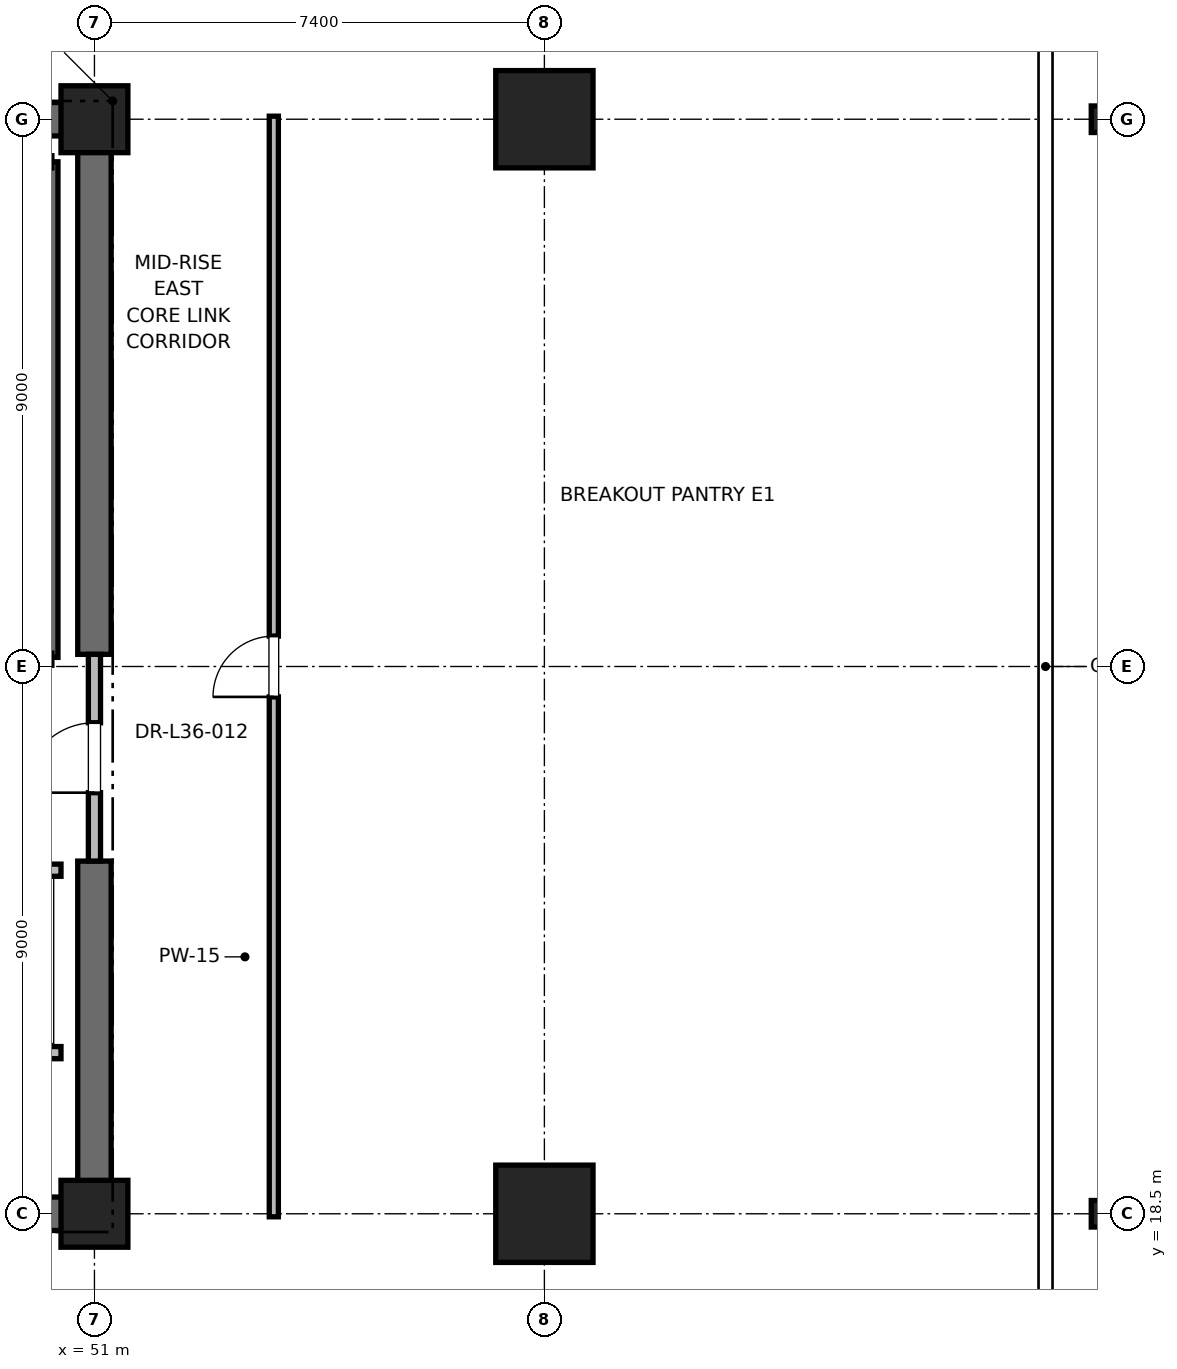
"""IFC4 building model, lengths in metres.
Left out: names, types, materials, properties, quantities, classifications, styles, units other than length and angle.
Written with IfcOpenShell. Run it as: python <this file> out.ifc"""

import sys

from ifc_helpers import new_model, si_unit, direction, frame, frame_2d, origin, origin_2d, place, context, subcontext, project, spatial, rectangle, i_section, extrude, element, fill, save


model = new_model("IFC4")
c1 = context("Model", 3, precision=1e-05, world=origin(), true_north=direction((0.0, 1.0)))
c2 = subcontext(c1, "Body", "Model", "MODEL_VIEW")
j1 = project(units=[si_unit("LENGTHUNIT", "METRE"), si_unit("PLANEANGLEUNIT", "RADIAN")], contexts=[c1])
p1 = place(None, origin())
s1 = spatial("IfcSite", under=j1, at=p1, CompositionType="ELEMENT")
p2 = place(p1, origin())
s2 = spatial("IfcBuilding", under=s1, at=p2, CompositionType="ELEMENT")
p3 = place(p2, frame((0.0, 0.0, 156.4)))
s3 = spatial("IfcBuildingStorey", under=s2, at=p3, CompositionType="ELEMENT", Elevation=156.4)
for number, where, z_axis, x_axis in (
    (1, (58.4, 18.5, 0.0), (0.0, 0.0, 1.0), (1.0, 0.0, 0.0)),
    (2, (58.4, 36.5, 0.0), (0.0, 0.0, 1.0), (1.0, 0.0, 0.0)),
):
    element("IfcColumn", number, at=place(p3, frame(where, z_axis=z_axis, x_axis=x_axis)), inside=s3, PredefinedType="COLUMN", context=c2, shape_type="SweptSolid", body=[
        extrude(rectangle(XDim=1.6, YDim=1.6, at=origin_2d()), origin(), (0.0, 0.0, 1.0), 4.0),
    ])
for number, where, z_axis, x_axis in (
    (3, (67.6, 18.5, 0.0), (0.0, 0.0, 1.0), (1.0, 0.0, 0.0)),
    (4, (67.6, 36.5, 0.0), (0.0, 0.0, 1.0), (1.0, 0.0, 0.0)),
):
    element("IfcColumn", number, at=place(p3, frame(where, z_axis=z_axis, x_axis=x_axis)), inside=s3, PredefinedType="COLUMN", context=c2, shape_type="SweptSolid", body=[
        extrude(i_section(OverallWidth=0.412, OverallDepth=0.437, WebThickness=0.036, FlangeThickness=0.058, FilletRadius=0.015, at=origin_2d()), origin(), (0.0, 0.0, 1.0), 4.0),
    ])
for number, where, z_axis, x_axis in (
    (5, (51.0, 18.5, 0.0), (0.0, 0.0, 1.0), (1.0, 0.0, 0.0)),
    (6, (51.0, 36.5, 0.0), (0.0, 0.0, 1.0), (1.0, 0.0, 0.0)),
):
    element("IfcColumn", number, at=place(p3, frame(where, z_axis=z_axis, x_axis=x_axis)), inside=s3, PredefinedType="PILASTER", context=c2, shape_type="SweptSolid", body=[
        extrude(rectangle(XDim=1.1, YDim=1.1, at=origin_2d()), origin(), (0.0, 0.0, 1.0), 4.0),
    ])
p4 = place(p3, frame((41.8, 18.5, 0.0), z_axis=(0.0, 0.0, 1.0), x_axis=(1.0, 0.0, 0.0)))
e7 = element("IfcWall", 7, at=p4, inside=s3, PredefinedType="SHEAR", context=c2, shape_type="SweptSolid", body=[
    extrude(rectangle(XDim=9.2, YDim=0.55, at=frame_2d((4.6, 0.0))), origin(), (0.0, 0.0, 1.0), 3.775),
])
for number, where, z_axis, x_axis in (
    (8, (45.2, 36.5, 0.0), (0.0, 0.0, 1.0), (1.0, 0.0, 0.0)),
    (9, (51.0, 18.5, 0.0), (0.0, 0.0, 1.0), (0.0, 1.0, 0.0)),
):
    element("IfcWall", number, at=place(p3, frame(where, z_axis=z_axis, x_axis=x_axis)), inside=s3, PredefinedType="SHEAR", context=c2, shape_type="SweptSolid", body=[
        extrude(rectangle(XDim=5.8, YDim=0.55, at=frame_2d((2.9, 0.0))), origin(), (0.0, 0.0, 1.0), 3.775),
    ])
p5 = place(p3, frame((51.0, 27.7, 0.0), z_axis=(0.0, 0.0, 1.0), x_axis=(0.0, 1.0, 0.0)))
e10 = element("IfcWall", 10, at=p5, inside=s3, PredefinedType="SHEAR", context=c2, shape_type="SweptSolid", body=[
    extrude(rectangle(XDim=8.8, YDim=0.55, at=frame_2d((4.4, 0.0))), origin(), (0.0, 0.0, 1.0), 3.775),
])
p6 = place(p3, frame((50.3, 27.65, 0.0), z_axis=(0.0, 0.0, 1.0), x_axis=(0.0, 1.0, 0.0)))
e11 = element("IfcWall", 11, at=p6, inside=s3, PredefinedType="SOLIDWALL", context=c2, shape_type="SweptSolid", body=[
    extrude(rectangle(XDim=8.15, YDim=0.2, at=frame_2d((4.075, 0.0))), origin(), (0.0, 0.0, 1.0), 3.775),
])
p7 = place(p3, frame((51.0, 24.3, 0.0), z_axis=(0.0, 0.0, 1.0), x_axis=(0.0, 1.0, 0.0)))
e12 = element("IfcWall", 12, at=p7, inside=s3, PredefinedType="PARTITIONING", context=c2, shape_type="SweptSolid", body=[
    extrude(rectangle(XDim=3.4, YDim=0.2, at=frame_2d((1.7, 0.0))), origin(), (0.0, 0.0, 1.0), 2.755),
])
p8 = place(p7, frame((1.125, 0.0, 0.0)))
e13 = element("IfcOpeningElement", 13, at=p8, cuts=e12, PredefinedType="OPENING", context=c2, shape_type="SweptSolid", body=[
    extrude(rectangle(XDim=1.15, YDim=2.2, at=frame_2d((0.575, 1.1))), frame((0.0, 0.1, 0.0), z_axis=(0.0, -1.0, 0.0), x_axis=(1.0, 0.0, 0.0)), (0.0, 0.0, 1.0), 0.2),
])
p9 = place(p3, frame((47.85, 21.15, 0.0), z_axis=(0.0, 0.0, 1.0), x_axis=(1.0, 0.0, 0.0)))
e14 = element("IfcWall", 14, at=p9, inside=s3, PredefinedType="SOLIDWALL", context=c2, shape_type="SweptSolid", body=[
    extrude(rectangle(XDim=2.6, YDim=0.2, at=frame_2d((1.3, 0.0))), origin(), (0.0, 0.0, 1.0), 3.775),
])
p10 = place(p3, frame((50.45, 24.15, 0.0), z_axis=(0.0, 0.0, 1.0), x_axis=(-1.0, 0.0, 0.0)))
e15 = element("IfcWall", 15, at=p10, inside=s3, PredefinedType="SOLIDWALL", context=c2, shape_type="SweptSolid", body=[
    extrude(rectangle(XDim=2.6, YDim=0.2, at=frame_2d((1.3, 0.0))), origin(), (0.0, 0.0, 1.0), 2.755),
])
p11 = place(p10, frame((0.75, 0.0, 0.0)))
e16 = element("IfcOpeningElement", 16, at=p11, cuts=e15, PredefinedType="OPENING", context=c2, shape_type="SweptSolid", body=[
    extrude(rectangle(XDim=1.1, YDim=2.2, at=frame_2d((0.55, 1.1))), frame((0.0, 0.1, 0.0), z_axis=(0.0, -1.0, 0.0), x_axis=(1.0, 0.0, 0.0)), (0.0, 0.0, 1.0), 0.2),
])
p12 = place(p3, frame((53.95, 18.45, 0.0), z_axis=(0.0, 0.0, 1.0), x_axis=(0.0, 1.0, 0.0)))
e17 = element("IfcWall", 17, at=p12, inside=s3, PredefinedType="PARTITIONING", context=c2, shape_type="SweptSolid", body=[
    extrude(rectangle(XDim=18.1, YDim=0.15, at=frame_2d((9.05, 0.0))), origin(), (0.0, 0.0, 1.0), 2.85),
])
p13 = place(p12, frame((8.55, 0.0, 0.0)))
e18 = element("IfcOpeningElement", 18, at=p13, cuts=e17, PredefinedType="OPENING", context=c2, shape_type="SweptSolid", body=[
    extrude(rectangle(XDim=1.0, YDim=2.15, at=frame_2d((0.5, 1.075))), frame((0.0, 0.075, 0.0), z_axis=(0.0, -1.0, 0.0), x_axis=(1.0, 0.0, 0.0)), (0.0, 0.0, 1.0), 0.15),
])
p14 = place(p8, origin())
e19 = element("IfcDoor", 19, at=p14, inside=s3, OperationType="SINGLE_SWING_LEFT", PredefinedType="DOOR", context=c2, shape_type="SweptSolid", body=[
    extrude(rectangle(XDim=1.15, YDim=2.2, at=frame_2d((0.575, 1.1))), frame((0.0, 0.025, 0.0), z_axis=(0.0, -1.0, 0.0), x_axis=(1.0, 0.0, 0.0)), (0.0, 0.0, 1.0), 0.05),
])
fill(e13, e19)
p15 = place(p13, origin())
e20 = element("IfcDoor", 20, at=p15, inside=s3, OperationType="SINGLE_SWING_LEFT", PredefinedType="DOOR", context=c2, shape_type="SweptSolid", body=[
    extrude(rectangle(XDim=1.0, YDim=2.15, at=frame_2d((0.5, 1.075))), frame((0.0, 0.025, 0.0), z_axis=(0.0, -1.0, 0.0), x_axis=(1.0, 0.0, 0.0)), (0.0, 0.0, 1.0), 0.05),
])
fill(e18, e20)
save(model, sys.argv[1])
